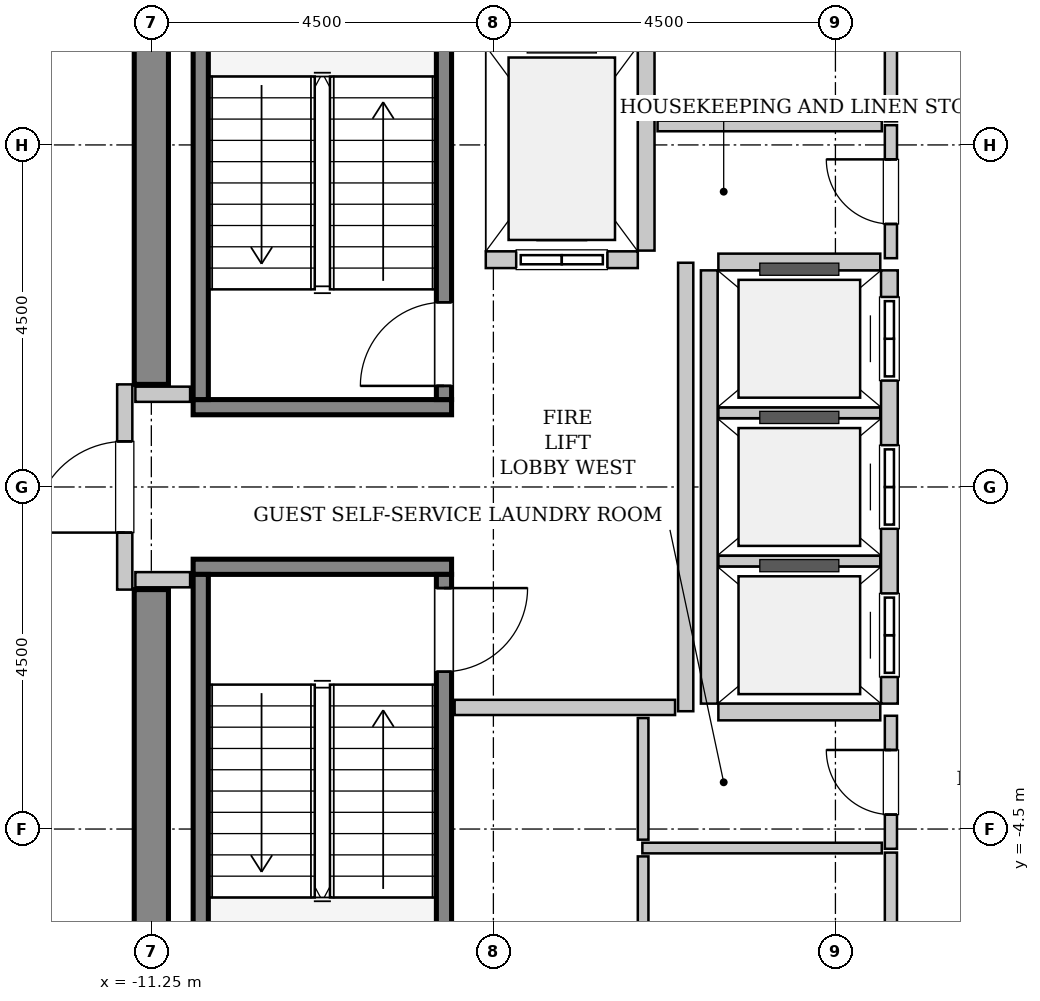
"""IFC4 building model, lengths in metres.
Left out: names, types, materials, properties, quantities, classifications, styles, units other than length and angle.
Written with IfcOpenShell. Run it as: python <this file> out.ifc"""

import sys

from ifc_helpers import new_model, si_unit, direction, frame, frame_2d, origin, place, context, subcontext, project, spatial, rectangle, extrude, source, transform, mapped, element, fill, save


model = new_model("IFC4")
c1 = context("Model", 3, precision=1e-05, world=origin(), true_north=direction((0.0, 1.0)))
c2 = subcontext(c1, "Body", "Model", "MODEL_VIEW")
j1 = project(units=[si_unit("LENGTHUNIT", "METRE"), si_unit("PLANEANGLEUNIT", "RADIAN")], contexts=[c1])
p1 = place(None, origin())
s1 = spatial("IfcSite", under=j1, at=p1, CompositionType="ELEMENT")
p2 = place(p1, origin())
s2 = spatial("IfcBuilding", under=s1, at=p2, CompositionType="ELEMENT")
p3 = place(p2, frame((0.0, 0.0, 268.4)))
s3 = spatial("IfcBuildingStorey", under=s2, at=p3, CompositionType="ELEMENT", Elevation=268.4)
m1 = source(origin(), c2, "Body", "SweptSolid", [
    extrude(rectangle(XDim=7.425, YDim=0.45, at=frame_2d((3.712, 0.0))), origin(), (0.0, 0.0, 1.0), 3.8),
])
for number, where, z_axis, x_axis in (
    (1, (-11.25, -8.775, 0.0), (0.0, 0.0, 1.0), (0.0, 1.0, 0.0)),
    (2, (-11.25, 1.35, 0.0), (0.0, 0.0, 1.0), (0.0, 1.0, 0.0)),
):
    element("IfcWall", number, at=place(p3, frame(where, z_axis=z_axis, x_axis=x_axis)), inside=s3, PredefinedType="SHEAR", context=c2, shape_type="MappedRepresentation", body=[
        mapped(m1, transform((0.0, 0.0, 0.0), x_axis=(1.0, 0.0, 0.0), y_axis=(0.0, 1.0, 0.0), z_axis=(0.0, 0.0, 1.0), scale=1.0)),
    ])
m2 = source(origin(), c2, "Body", "SweptSolid", [
    extrude(rectangle(XDim=3.4, YDim=0.2, at=frame_2d((1.7, 0.0))), origin(), (0.0, 0.0, 1.0), 3.8),
])
p4 = place(p3, frame((-7.3, 1.05, 0.0), z_axis=(0.0, 0.0, 1.0), x_axis=(-1.0, 0.0, 0.0)))
e3 = element("IfcWall", 3, at=p4, inside=s3, PredefinedType="SOLIDWALL", context=c2, shape_type="MappedRepresentation", body=[
    mapped(m2, transform((0.0, 0.0, 0.0), x_axis=(1.0, 0.0, 0.0), y_axis=(0.0, 1.0, 0.0), z_axis=(0.0, 0.0, 1.0), scale=1.0)),
])
m3 = source(origin(), c2, "Body", "SweptSolid", [
    extrude(rectangle(XDim=7.1, YDim=0.2, at=frame_2d((3.55, 0.0))), origin(), (0.0, 0.0, 1.0), 3.8),
])
p5 = place(p3, frame((-7.4, 1.15, 0.0), z_axis=(0.0, 0.0, 1.0), x_axis=(0.0, 1.0, 0.0)))
e4 = element("IfcWall", 4, at=p5, inside=s3, PredefinedType="SOLIDWALL", context=c2, shape_type="MappedRepresentation", body=[
    mapped(m3, transform((0.0, 0.0, 0.0), x_axis=(1.0, 0.0, 0.0), y_axis=(0.0, 1.0, 0.0), z_axis=(0.0, 0.0, 1.0), scale=1.0)),
])
p6 = place(p5, frame((0.18, 0.0, 0.0)))
e5 = element("IfcOpeningElement", 5, at=p6, cuts=e4, PredefinedType="OPENING", context=c2, shape_type="SweptSolid", body=[
    extrude(rectangle(XDim=1.1, YDim=2.15, at=frame_2d((0.55, 1.075))), frame((0.0, 0.11, 0.0), z_axis=(0.0, -1.0, 0.0), x_axis=(1.0, 0.0, 0.0)), (0.0, 0.0, 1.0), 0.22),
])
p7 = place(p3, frame((-10.6, 1.15, 0.0), z_axis=(0.0, 0.0, 1.0), x_axis=(0.0, 1.0, 0.0)))
e6 = element("IfcWall", 6, at=p7, inside=s3, PredefinedType="SOLIDWALL", context=c2, shape_type="MappedRepresentation", body=[
    mapped(m3, transform((0.0, 0.0, 0.0), x_axis=(1.0, 0.0, 0.0), y_axis=(0.0, 1.0, 0.0), z_axis=(0.0, 0.0, 1.0), scale=1.0)),
])
p8 = place(p3, frame((-10.7, -1.05, 0.0), z_axis=(0.0, 0.0, 1.0), x_axis=(1.0, 0.0, 0.0)))
e7 = element("IfcWall", 7, at=p8, inside=s3, PredefinedType="SOLIDWALL", context=c2, shape_type="MappedRepresentation", body=[
    mapped(m2, transform((0.0, 0.0, 0.0), x_axis=(1.0, 0.0, 0.0), y_axis=(0.0, 1.0, 0.0), z_axis=(0.0, 0.0, 1.0), scale=1.0)),
])
p9 = place(p3, frame((-10.6, -1.15, 0.0), z_axis=(0.0, 0.0, 1.0), x_axis=(0.0, -1.0, 0.0)))
e8 = element("IfcWall", 8, at=p9, inside=s3, PredefinedType="SOLIDWALL", context=c2, shape_type="MappedRepresentation", body=[
    mapped(m3, transform((0.0, 0.0, 0.0), x_axis=(1.0, 0.0, 0.0), y_axis=(0.0, 1.0, 0.0), z_axis=(0.0, 0.0, 1.0), scale=1.0)),
])
p10 = place(p3, frame((-7.4, -1.15, 0.0), z_axis=(0.0, 0.0, 1.0), x_axis=(0.0, -1.0, 0.0)))
e9 = element("IfcWall", 9, at=p10, inside=s3, PredefinedType="SOLIDWALL", context=c2, shape_type="MappedRepresentation", body=[
    mapped(m3, transform((0.0, 0.0, 0.0), x_axis=(1.0, 0.0, 0.0), y_axis=(0.0, 1.0, 0.0), z_axis=(0.0, 0.0, 1.0), scale=1.0)),
])
p11 = place(p10, frame((0.18, 0.0, 0.0)))
e10 = element("IfcOpeningElement", 10, at=p11, cuts=e9, PredefinedType="OPENING", context=c2, shape_type="SweptSolid", body=[
    extrude(rectangle(XDim=1.1, YDim=2.15, at=frame_2d((0.55, 1.075))), frame((0.0, 0.11, 0.0), z_axis=(0.0, -1.0, 0.0), x_axis=(1.0, 0.0, 0.0)), (0.0, 0.0, 1.0), 0.22),
])
m4 = source(origin(), c2, "Body", "SweptSolid", [
    extrude(rectangle(XDim=2.0, YDim=0.22, at=frame_2d((1.0, 0.0))), origin(), (0.0, 0.0, 1.0), 3.535),
])
p12 = place(p3, frame((-6.85, 2.99, 0.0), z_axis=(0.0, 0.0, 1.0), x_axis=(1.0, 0.0, 0.0)))
e11 = element("IfcWall", 11, at=p12, inside=s3, PredefinedType="SOLIDWALL", context=c2, shape_type="MappedRepresentation", body=[
    mapped(m4, transform((0.0, 0.0, 0.0), x_axis=(1.0, 0.0, 0.0), y_axis=(0.0, 1.0, 0.0), z_axis=(0.0, 0.0, 1.0), scale=1.0)),
])
p13 = place(p12, frame((0.4, 0.0, 0.0)))
e12 = element("IfcOpeningElement", 12, at=p13, cuts=e11, PredefinedType="OPENING", context=c2, shape_type="SweptSolid", body=[
    extrude(rectangle(XDim=1.2, YDim=2.2, at=frame_2d((0.6, 1.1))), frame((0.0, 0.12, 0.0), z_axis=(0.0, -1.0, 0.0), x_axis=(1.0, 0.0, 0.0)), (0.0, 0.0, 1.0), 0.24),
])
m5 = source(origin(), c2, "Body", "SweptSolid", [
    extrude(rectangle(XDim=2.68, YDim=0.22, at=frame_2d((1.34, 0.0))), origin(), (0.0, 0.0, 1.0), 3.535),
])
p14 = place(p3, frame((-4.74, 3.11, 0.0), z_axis=(0.0, 0.0, 1.0), x_axis=(0.0, 1.0, 0.0)))
e13 = element("IfcWall", 13, at=p14, inside=s3, PredefinedType="SOLIDWALL", context=c2, shape_type="MappedRepresentation", body=[
    mapped(m5, transform((0.0, 0.0, 0.0), x_axis=(1.0, 0.0, 0.0), y_axis=(0.0, 1.0, 0.0), z_axis=(0.0, 0.0, 1.0), scale=1.0)),
])
m6 = source(origin(), c2, "Body", "SweptSolid", [
    extrude(rectangle(XDim=5.7, YDim=0.22, at=frame_2d((2.85, 0.0))), origin(), (0.0, 0.0, 1.0), 3.535),
])
p15 = place(p3, frame((-1.54, -2.85, 0.0), z_axis=(0.0, 0.0, 1.0), x_axis=(0.0, 1.0, 0.0)))
e14 = element("IfcWall", 14, at=p15, inside=s3, PredefinedType="SOLIDWALL", context=c2, shape_type="MappedRepresentation", body=[
    mapped(m6, transform((0.0, 0.0, 0.0), x_axis=(1.0, 0.0, 0.0), y_axis=(0.0, 1.0, 0.0), z_axis=(0.0, 0.0, 1.0), scale=1.0)),
])
p16 = place(p15, frame((0.35, 0.0, 0.0)))
e15 = element("IfcOpeningElement", 15, at=p16, cuts=e14, PredefinedType="OPENING", context=c2, shape_type="SweptSolid", body=[
    extrude(rectangle(XDim=1.1, YDim=2.2, at=frame_2d((0.55, 1.1))), frame((0.0, 0.12, 0.0), z_axis=(0.0, -1.0, 0.0), x_axis=(1.0, 0.0, 0.0)), (0.0, 0.0, 1.0), 0.24),
])
p17 = place(p15, frame((2.3, 0.0, 0.0)))
e16 = element("IfcOpeningElement", 16, at=p17, cuts=e14, PredefinedType="OPENING", context=c2, shape_type="SweptSolid", body=[
    extrude(rectangle(XDim=1.1, YDim=2.2, at=frame_2d((0.55, 1.1))), frame((0.0, 0.12, 0.0), z_axis=(0.0, -1.0, 0.0), x_axis=(1.0, 0.0, 0.0)), (0.0, 0.0, 1.0), 0.24),
])
p18 = place(p15, frame((4.25, 0.0, 0.0)))
e17 = element("IfcOpeningElement", 17, at=p18, cuts=e14, PredefinedType="OPENING", context=c2, shape_type="SweptSolid", body=[
    extrude(rectangle(XDim=1.1, YDim=2.2, at=frame_2d((0.55, 1.1))), frame((0.0, 0.12, 0.0), z_axis=(0.0, -1.0, 0.0), x_axis=(1.0, 0.0, 0.0)), (0.0, 0.0, 1.0), 0.24),
])
p19 = place(p3, frame((-3.91, 2.85, 0.0), z_axis=(0.0, 0.0, 1.0), x_axis=(0.0, -1.0, 0.0)))
e18 = element("IfcWall", 18, at=p19, inside=s3, PredefinedType="SOLIDWALL", context=c2, shape_type="MappedRepresentation", body=[
    mapped(m6, transform((0.0, 0.0, 0.0), x_axis=(1.0, 0.0, 0.0), y_axis=(0.0, 1.0, 0.0), z_axis=(0.0, 0.0, 1.0), scale=1.0)),
])
m7 = source(origin(), c2, "Body", "SweptSolid", [
    extrude(rectangle(XDim=2.13, YDim=0.22, at=frame_2d((1.065, 0.0))), origin(), (0.0, 0.0, 1.0), 3.535),
])
p20 = place(p3, frame((-3.79, -2.96, 0.0), z_axis=(0.0, 0.0, 1.0), x_axis=(1.0, 0.0, 0.0)))
e19 = element("IfcWall", 19, at=p20, inside=s3, PredefinedType="SOLIDWALL", context=c2, shape_type="MappedRepresentation", body=[
    mapped(m7, transform((0.0, 0.0, 0.0), x_axis=(1.0, 0.0, 0.0), y_axis=(0.0, 1.0, 0.0), z_axis=(0.0, 0.0, 1.0), scale=1.0)),
])
m8 = source(origin(), c2, "Body", "SweptSolid", [
    extrude(rectangle(XDim=2.13, YDim=0.14, at=frame_2d((1.065, 0.0))), origin(), (0.0, 0.0, 1.0), 3.535),
])
for number, where, z_axis, x_axis in (
    (20, (-3.79, -0.975, 0.0), (0.0, 0.0, 1.0), (1.0, 0.0, 0.0)),
    (21, (-3.79, 0.975, 0.0), (0.0, 0.0, 1.0), (1.0, 0.0, 0.0)),
):
    element("IfcWall", number, at=place(p3, frame(where, z_axis=z_axis, x_axis=x_axis)), inside=s3, PredefinedType="PARTITIONING", context=c2, shape_type="MappedRepresentation", body=[
        mapped(m8, transform((0.0, 0.0, 0.0), x_axis=(1.0, 0.0, 0.0), y_axis=(0.0, 1.0, 0.0), z_axis=(0.0, 0.0, 1.0), scale=1.0)),
    ])
p21 = place(p3, frame((-1.66, 2.96, 0.0), z_axis=(0.0, 0.0, 1.0), x_axis=(-1.0, 0.0, 0.0)))
e22 = element("IfcWall", 22, at=p21, inside=s3, PredefinedType="SOLIDWALL", context=c2, shape_type="MappedRepresentation", body=[
    mapped(m7, transform((0.0, 0.0, 0.0), x_axis=(1.0, 0.0, 0.0), y_axis=(0.0, 1.0, 0.0), z_axis=(0.0, 0.0, 1.0), scale=1.0)),
])
m9 = source(origin(), c2, "Body", "SweptSolid", [
    extrude(rectangle(XDim=2.7, YDim=0.2, at=frame_2d((1.35, 0.0))), origin(), (0.0, 0.0, 1.0), 2.625),
])
p22 = place(p3, frame((-11.6, -1.35, 0.0), z_axis=(0.0, 0.0, 1.0), x_axis=(0.0, 1.0, 0.0)))
e23 = element("IfcWall", 23, at=p22, inside=s3, PredefinedType="PARTITIONING", context=c2, shape_type="MappedRepresentation", body=[
    mapped(m9, transform((0.0, 0.0, 0.0), x_axis=(1.0, 0.0, 0.0), y_axis=(0.0, 1.0, 0.0), z_axis=(0.0, 0.0, 1.0), scale=1.0)),
])
p23 = place(p22, frame((0.75, 0.0, 0.0)))
e24 = element("IfcOpeningElement", 24, at=p23, cuts=e23, PredefinedType="OPENING", context=c2, shape_type="SweptSolid", body=[
    extrude(rectangle(XDim=1.2, YDim=2.15, at=frame_2d((0.6, 1.075))), frame((0.0, 0.11, 0.0), z_axis=(0.0, -1.0, 0.0), x_axis=(1.0, 0.0, 0.0)), (0.0, 0.0, 1.0), 0.22),
])
m10 = source(origin(), c2, "Body", "SweptSolid", [
    extrude(rectangle(XDim=5.9, YDim=0.2, at=frame_2d((2.95, 0.0))), origin(), (0.0, 0.0, 1.0), 3.535),
])
p24 = place(p3, frame((-4.22, -2.95, 0.0), z_axis=(0.0, 0.0, 1.0), x_axis=(0.0, 1.0, 0.0)))
e25 = element("IfcWall", 25, at=p24, inside=s3, PredefinedType="PARTITIONING", context=c2, shape_type="MappedRepresentation", body=[
    mapped(m10, transform((0.0, 0.0, 0.0), x_axis=(1.0, 0.0, 0.0), y_axis=(0.0, 1.0, 0.0), z_axis=(0.0, 0.0, 1.0), scale=1.0)),
])
m11 = source(origin(), c2, "Body", "SweptSolid", [
    extrude(rectangle(XDim=2.9, YDim=0.2, at=frame_2d((1.45, 0.0))), origin(), (0.0, 0.0, 1.0), 3.535),
])
p25 = place(p3, frame((-7.26, -2.9, 0.0), z_axis=(0.0, 0.0, 1.0), x_axis=(1.0, 0.0, 0.0)))
e26 = element("IfcWall", 26, at=p25, inside=s3, PredefinedType="PARTITIONING", context=c2, shape_type="MappedRepresentation", body=[
    mapped(m11, transform((0.0, 0.0, 0.0), x_axis=(1.0, 0.0, 0.0), y_axis=(0.0, 1.0, 0.0), z_axis=(0.0, 0.0, 1.0), scale=1.0)),
])
m12 = source(origin(), c2, "Body", "SweptSolid", [
    extrude(rectangle(XDim=0.72, YDim=0.2, at=frame_2d((0.36, 0.0))), origin(), (0.0, 0.0, 1.0), 3.535),
])
for number, where, z_axis, x_axis in (
    (27, (-11.46, 1.22, 0.0), (0.0, 0.0, 1.0), (1.0, 0.0, 0.0)),
    (28, (-11.46, -1.22, 0.0), (0.0, 0.0, 1.0), (1.0, 0.0, 0.0)),
):
    element("IfcWall", number, at=place(p3, frame(where, z_axis=z_axis, x_axis=x_axis)), inside=s3, PredefinedType="PARTITIONING", context=c2, shape_type="MappedRepresentation", body=[
        mapped(m12, transform((0.0, 0.0, 0.0), x_axis=(1.0, 0.0, 0.0), y_axis=(0.0, 1.0, 0.0), z_axis=(0.0, 0.0, 1.0), scale=1.0)),
    ])
m13 = source(origin(), c2, "Body", "SweptSolid", [
    extrude(rectangle(XDim=1.75, YDim=0.16, at=frame_2d((0.875, 0.0))), origin(), (0.0, 0.0, 1.0), 3.535),
])
p26 = place(p3, frame((-1.52, 3.01, 0.0), z_axis=(0.0, 0.0, 1.0), x_axis=(0.0, 1.0, 0.0)))
e29 = element("IfcWall", 29, at=p26, inside=s3, PredefinedType="PARTITIONING", context=c2, shape_type="MappedRepresentation", body=[
    mapped(m13, transform((0.0, 0.0, 0.0), x_axis=(1.0, 0.0, 0.0), y_axis=(0.0, 1.0, 0.0), z_axis=(0.0, 0.0, 1.0), scale=1.0)),
])
p27 = place(p26, frame((0.45, 0.0, 0.0)))
e30 = element("IfcOpeningElement", 30, at=p27, cuts=e29, PredefinedType="OPENING", context=c2, shape_type="SweptSolid", body=[
    extrude(rectangle(XDim=0.85, YDim=2.1, at=frame_2d((0.425, 1.05))), frame((0.0, 0.09, 0.0), z_axis=(0.0, -1.0, 0.0), x_axis=(1.0, 0.0, 0.0)), (0.0, 0.0, 1.0), 0.18),
])
m14 = source(origin(), c2, "Body", "SweptSolid", [
    extrude(rectangle(XDim=2.95, YDim=0.14, at=frame_2d((1.475, 0.0))), origin(), (0.0, 0.0, 1.0), 3.535),
])
p28 = place(p3, frame((-4.59, 4.75, 0.0), z_axis=(0.0, 0.0, 1.0), x_axis=(1.0, 0.0, 0.0)))
e31 = element("IfcWall", 31, at=p28, inside=s3, PredefinedType="PARTITIONING", context=c2, shape_type="MappedRepresentation", body=[
    mapped(m14, transform((0.0, 0.0, 0.0), x_axis=(1.0, 0.0, 0.0), y_axis=(0.0, 1.0, 0.0), z_axis=(0.0, 0.0, 1.0), scale=1.0)),
])
m15 = source(origin(), c2, "Body", "SweptSolid", [
    extrude(rectangle(XDim=3.68, YDim=0.16, at=frame_2d((1.84, 0.0))), origin(), (0.0, 0.0, 1.0), 3.535),
])
p29 = place(p3, frame((-1.52, 4.81, 0.0), z_axis=(0.0, 0.0, 1.0), x_axis=(0.0, 1.0, 0.0)))
e32 = element("IfcWall", 32, at=p29, inside=s3, PredefinedType="PARTITIONING", context=c2, shape_type="MappedRepresentation", body=[
    mapped(m15, transform((0.0, 0.0, 0.0), x_axis=(1.0, 0.0, 0.0), y_axis=(0.0, 1.0, 0.0), z_axis=(0.0, 0.0, 1.0), scale=1.0)),
])
p30 = place(p29, frame((1.415, 0.0, 0.0)))
e33 = element("IfcOpeningElement", 33, at=p30, cuts=e32, PredefinedType="OPENING", context=c2, shape_type="SweptSolid", body=[
    extrude(rectangle(XDim=0.85, YDim=2.1, at=frame_2d((0.425, 1.05))), frame((0.0, 0.09, 0.0), z_axis=(0.0, -1.0, 0.0), x_axis=(1.0, 0.0, 0.0)), (0.0, 0.0, 1.0), 0.18),
])
p31 = place(p3, frame((-1.52, -4.76, 0.0), z_axis=(0.0, 0.0, 1.0), x_axis=(0.0, 1.0, 0.0)))
e34 = element("IfcWall", 34, at=p31, inside=s3, PredefinedType="PARTITIONING", context=c2, shape_type="MappedRepresentation", body=[
    mapped(m13, transform((0.0, 0.0, 0.0), x_axis=(1.0, 0.0, 0.0), y_axis=(0.0, 1.0, 0.0), z_axis=(0.0, 0.0, 1.0), scale=1.0)),
])
p32 = place(p31, frame((0.45, 0.0, 0.0)))
e35 = element("IfcOpeningElement", 35, at=p32, cuts=e34, PredefinedType="OPENING", context=c2, shape_type="SweptSolid", body=[
    extrude(rectangle(XDim=0.85, YDim=2.1, at=frame_2d((0.425, 1.05))), frame((0.0, 0.09, 0.0), z_axis=(0.0, -1.0, 0.0), x_axis=(1.0, 0.0, 0.0)), (0.0, 0.0, 1.0), 0.18),
])
m16 = source(origin(), c2, "Body", "SweptSolid", [
    extrude(rectangle(XDim=3.15, YDim=0.14, at=frame_2d((1.575, 0.0))), origin(), (0.0, 0.0, 1.0), 3.535),
])
p33 = place(p3, frame((-4.79, -4.75, 0.0), z_axis=(0.0, 0.0, 1.0), x_axis=(1.0, 0.0, 0.0)))
e36 = element("IfcWall", 36, at=p33, inside=s3, PredefinedType="PARTITIONING", context=c2, shape_type="MappedRepresentation", body=[
    mapped(m16, transform((0.0, 0.0, 0.0), x_axis=(1.0, 0.0, 0.0), y_axis=(0.0, 1.0, 0.0), z_axis=(0.0, 0.0, 1.0), scale=1.0)),
])
m17 = source(origin(), c2, "Body", "SweptSolid", [
    extrude(rectangle(XDim=1.6, YDim=0.14, at=frame_2d((0.8, 0.0))), origin(), (0.0, 0.0, 1.0), 3.535),
])
p34 = place(p3, frame((-4.78, -4.64, 0.0), z_axis=(0.0, 0.0, 1.0), x_axis=(0.0, 1.0, 0.0)))
e37 = element("IfcWall", 37, at=p34, inside=s3, PredefinedType="PARTITIONING", context=c2, shape_type="MappedRepresentation", body=[
    mapped(m17, transform((0.0, 0.0, 0.0), x_axis=(1.0, 0.0, 0.0), y_axis=(0.0, 1.0, 0.0), z_axis=(0.0, 0.0, 1.0), scale=1.0)),
])
p35 = place(p3, frame((-1.52, -8.49, 0.0), z_axis=(0.0, 0.0, 1.0), x_axis=(0.0, 1.0, 0.0)))
e38 = element("IfcWall", 38, at=p35, inside=s3, PredefinedType="PARTITIONING", context=c2, shape_type="MappedRepresentation", body=[
    mapped(m15, transform((0.0, 0.0, 0.0), x_axis=(1.0, 0.0, 0.0), y_axis=(0.0, 1.0, 0.0), z_axis=(0.0, 0.0, 1.0), scale=1.0)),
])
p36 = place(p35, frame((1.415, 0.0, 0.0)))
e39 = element("IfcOpeningElement", 39, at=p36, cuts=e38, PredefinedType="OPENING", context=c2, shape_type="SweptSolid", body=[
    extrude(rectangle(XDim=0.85, YDim=2.1, at=frame_2d((0.425, 1.05))), frame((0.0, 0.09, 0.0), z_axis=(0.0, -1.0, 0.0), x_axis=(1.0, 0.0, 0.0)), (0.0, 0.0, 1.0), 0.18),
])
m18 = source(origin(), c2, "Body", "SweptSolid", [
    extrude(rectangle(XDim=3.63, YDim=0.14, at=frame_2d((1.815, 0.0))), origin(), (0.0, 0.0, 1.0), 3.535),
])
p37 = place(p3, frame((-4.78, -8.49, 0.0), z_axis=(0.0, 0.0, 1.0), x_axis=(0.0, 1.0, 0.0)))
e40 = element("IfcWall", 40, at=p37, inside=s3, PredefinedType="PARTITIONING", context=c2, shape_type="MappedRepresentation", body=[
    mapped(m18, transform((0.0, 0.0, 0.0), x_axis=(1.0, 0.0, 0.0), y_axis=(0.0, 1.0, 0.0), z_axis=(0.0, 0.0, 1.0), scale=1.0)),
])
m19 = source(origin(), c2, "Body", "SweptSolid", [
    extrude(rectangle(XDim=1.1, YDim=2.15, at=frame_2d((0.55, 1.075))), frame((0.0, 0.025, 0.0), z_axis=(0.0, -1.0, 0.0), x_axis=(1.0, 0.0, 0.0)), (0.0, 0.0, 1.0), 0.05),
])
p38 = place(p6, origin())
e41 = element("IfcDoor", 41, at=p38, inside=s3, OperationType="SINGLE_SWING_LEFT", PredefinedType="DOOR", context=c2, shape_type="MappedRepresentation", body=[
    mapped(m19, transform((0.0, 0.0, 0.0), x_axis=(1.0, 0.0, 0.0), y_axis=(0.0, 1.0, 0.0), z_axis=(0.0, 0.0, 1.0), scale=1.0)),
])
fill(e5, e41)
p39 = place(p11, origin())
e42 = element("IfcDoor", 42, at=p39, inside=s3, OperationType="SINGLE_SWING_LEFT", PredefinedType="DOOR", context=c2, shape_type="MappedRepresentation", body=[
    mapped(m19, transform((0.0, 0.0, 0.0), x_axis=(1.0, 0.0, 0.0), y_axis=(0.0, 1.0, 0.0), z_axis=(0.0, 0.0, 1.0), scale=1.0)),
])
fill(e10, e42)
m20 = source(origin(), c2, "Body", "SweptSolid", [
    extrude(rectangle(XDim=1.2, YDim=2.2, at=frame_2d((0.6, 1.1))), frame((0.0, 0.025, 0.0), z_axis=(0.0, -1.0, 0.0), x_axis=(1.0, 0.0, 0.0)), (0.0, 0.0, 1.0), 0.05),
])
p40 = place(p13, origin())
e43 = element("IfcDoor", 43, at=p40, inside=s3, OperationType="SLIDING_TO_LEFT", PredefinedType="DOOR", context=c2, shape_type="MappedRepresentation", body=[
    mapped(m20, transform((0.0, 0.0, 0.0), x_axis=(1.0, 0.0, 0.0), y_axis=(0.0, 1.0, 0.0), z_axis=(0.0, 0.0, 1.0), scale=1.0)),
])
fill(e12, e43)
m21 = source(origin(), c2, "Body", "SweptSolid", [
    extrude(rectangle(XDim=1.1, YDim=2.2, at=frame_2d((0.55, 1.1))), frame((0.0, 0.025, 0.0), z_axis=(0.0, -1.0, 0.0), x_axis=(1.0, 0.0, 0.0)), (0.0, 0.0, 1.0), 0.05),
])
p41 = place(p16, origin())
e44 = element("IfcDoor", 44, at=p41, inside=s3, OperationType="DOUBLE_DOOR_SLIDING", PredefinedType="DOOR", context=c2, shape_type="MappedRepresentation", body=[
    mapped(m21, transform((0.0, 0.0, 0.0), x_axis=(1.0, 0.0, 0.0), y_axis=(0.0, 1.0, 0.0), z_axis=(0.0, 0.0, 1.0), scale=1.0)),
])
fill(e15, e44)
p42 = place(p17, origin())
e45 = element("IfcDoor", 45, at=p42, inside=s3, OperationType="DOUBLE_DOOR_SLIDING", PredefinedType="DOOR", context=c2, shape_type="MappedRepresentation", body=[
    mapped(m21, transform((0.0, 0.0, 0.0), x_axis=(1.0, 0.0, 0.0), y_axis=(0.0, 1.0, 0.0), z_axis=(0.0, 0.0, 1.0), scale=1.0)),
])
fill(e16, e45)
p43 = place(p18, origin())
e46 = element("IfcDoor", 46, at=p43, inside=s3, OperationType="DOUBLE_DOOR_SLIDING", PredefinedType="DOOR", context=c2, shape_type="MappedRepresentation", body=[
    mapped(m21, transform((0.0, 0.0, 0.0), x_axis=(1.0, 0.0, 0.0), y_axis=(0.0, 1.0, 0.0), z_axis=(0.0, 0.0, 1.0), scale=1.0)),
])
fill(e17, e46)
m22 = source(origin(), c2, "Body", "SweptSolid", [
    extrude(rectangle(XDim=1.2, YDim=2.15, at=frame_2d((0.6, 1.075))), frame((0.0, 0.025, 0.0), z_axis=(0.0, -1.0, 0.0), x_axis=(1.0, 0.0, 0.0)), (0.0, 0.0, 1.0), 0.05),
])
p44 = place(p23, origin())
e47 = element("IfcDoor", 47, at=p44, inside=s3, OperationType="SINGLE_SWING_LEFT", PredefinedType="DOOR", context=c2, shape_type="MappedRepresentation", body=[
    mapped(m22, transform((0.0, 0.0, 0.0), x_axis=(1.0, 0.0, 0.0), y_axis=(0.0, 1.0, 0.0), z_axis=(0.0, 0.0, 1.0), scale=1.0)),
])
fill(e24, e47)
m23 = source(origin(), c2, "Body", "SweptSolid", [
    extrude(rectangle(XDim=0.85, YDim=2.1, at=frame_2d((0.425, 1.05))), frame((0.0, 0.025, 0.0), z_axis=(0.0, -1.0, 0.0), x_axis=(1.0, 0.0, 0.0)), (0.0, 0.0, 1.0), 0.05),
])
p45 = place(p27, origin())
e48 = element("IfcDoor", 48, at=p45, inside=s3, OperationType="SINGLE_SWING_RIGHT", PredefinedType="DOOR", context=c2, shape_type="MappedRepresentation", body=[
    mapped(m23, transform((0.0, 0.0, 0.0), x_axis=(1.0, 0.0, 0.0), y_axis=(0.0, 1.0, 0.0), z_axis=(0.0, 0.0, 1.0), scale=1.0)),
])
fill(e30, e48)
p46 = place(p32, origin())
e49 = element("IfcDoor", 49, at=p46, inside=s3, OperationType="SINGLE_SWING_RIGHT", PredefinedType="DOOR", context=c2, shape_type="MappedRepresentation", body=[
    mapped(m23, transform((0.0, 0.0, 0.0), x_axis=(1.0, 0.0, 0.0), y_axis=(0.0, 1.0, 0.0), z_axis=(0.0, 0.0, 1.0), scale=1.0)),
])
fill(e35, e49)
save(model, sys.argv[1])
